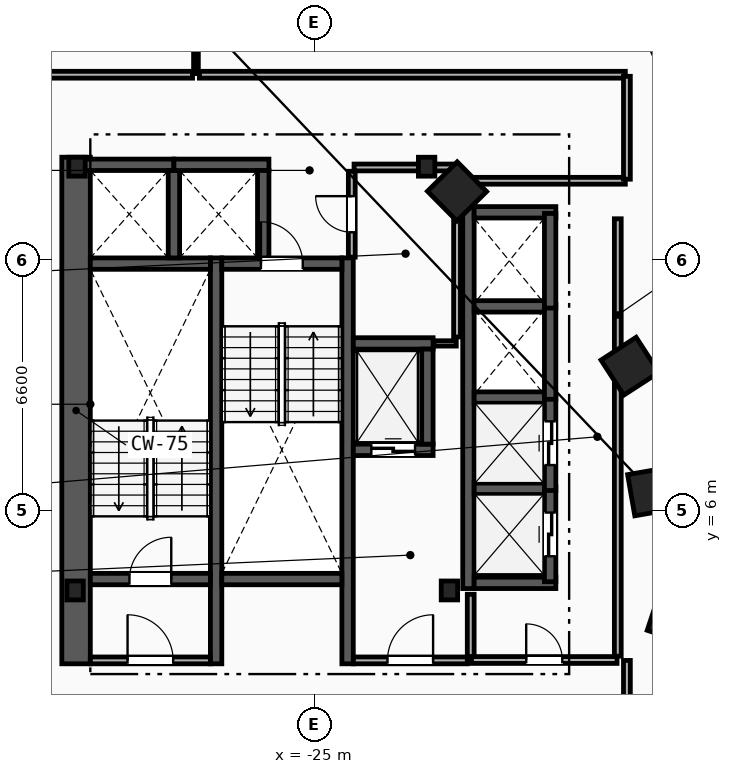
"""IFC4 building model, lengths in metres.
Left out: names, types, materials, properties, quantities, classifications, styles, units other than length and angle.
Written with IfcOpenShell. Run it as: python <this file> out.ifc"""

import sys

from ifc_helpers import new_model, si_unit, direction, frame, frame_2d, origin, origin_2d, place, context, subcontext, project, spatial, rectangle, i_section, extrude, element, fill, save


model = new_model("IFC4")
c1 = context("Model", 3, precision=1e-05, world=origin(), true_north=direction((0.0, 1.0)))
c2 = subcontext(c1, "Body", "Model", "MODEL_VIEW")
j1 = project(units=[si_unit("LENGTHUNIT", "METRE"), si_unit("PLANEANGLEUNIT", "RADIAN")], contexts=[c1])
p1 = place(None, origin())
s1 = spatial("IfcSite", under=j1, at=p1, CompositionType="ELEMENT")
p2 = place(p1, origin())
s2 = spatial("IfcBuilding", under=s1, at=p2, CompositionType="ELEMENT")
p3 = place(p2, frame((0.0, 0.0, 96.2)))
s3 = spatial("IfcBuildingStorey", under=s2, at=p3, CompositionType="ELEMENT", Elevation=96.2)
for number, where, z_axis, x_axis in (
    (1, (-31.3, 3.9, 0.0), (0.0, 0.0, 1.0), (1.0, 0.0, 0.0)),
    (2, (-21.45, 3.9, 0.0), (0.0, 0.0, 1.0), (1.0, 0.0, 0.0)),
    (3, (-22.05, 15.05, 0.0), (0.0, 0.0, 1.0), (1.0, 0.0, 0.0)),
    (4, (-31.25, 15.05, 0.0), (0.0, 0.0, 1.0), (1.0, 0.0, 0.0)),
):
    element("IfcColumn", number, at=place(p3, frame(where, z_axis=z_axis, x_axis=x_axis)), inside=s3, PredefinedType="COLUMN", context=c2, shape_type="SweptSolid", body=[
        extrude(i_section(OverallWidth=0.432, OverallDepth=0.498, WebThickness=0.056, FlangeThickness=0.089, FilletRadius=0.018, at=origin_2d()), origin(), (0.0, 0.0, 1.0), 3.6),
    ])
for number, where, z_axis, x_axis in (
    (5, (-15.55, 3.2, 0.0), (0.0, 0.0, 1.0), (0.315, 0.949, 0.0)),
    (6, (-16.125, 6.5, 0.0), (0.0, 0.0, 1.0), (-0.172, 0.985, 0.0)),
    (7, (-16.7, 9.8, 0.0), (0.0, 0.0, 1.0), (-0.544, 0.839, 0.0)),
    (8, (-21.25, 14.4, 0.0), (0.0, 0.0, 1.0), (-0.703, 0.711, 0.0)),
):
    element("IfcColumn", number, at=place(p3, frame(where, z_axis=z_axis, x_axis=x_axis)), inside=s3, PredefinedType="COLUMN", context=c2, shape_type="SweptSolid", body=[
        extrude(rectangle(XDim=1.1, YDim=1.1, at=origin_2d()), origin(), (0.0, 0.0, 1.0), 3.6),
    ])
p4 = place(p3, frame((-31.275, 1.97, 0.0), z_axis=(0.0, 0.0, 1.0), x_axis=(0.0, 1.0, 0.0)))
e9 = element("IfcWall", 9, at=p4, inside=s3, PredefinedType="SHEAR", context=c2, shape_type="SweptSolid", body=[
    extrude(rectangle(XDim=13.33, YDim=0.75, at=frame_2d((6.665, 0.0))), origin(), (0.0, 0.0, 1.0), 3.3),
])
for number, where, z_axis, x_axis in (
    (10, (-27.59, 1.97, 0.0), (0.0, 0.0, 1.0), (0.0, 1.0, 0.0)),
    (11, (-24.13, 1.97, 0.0), (0.0, 0.0, 1.0), (0.0, 1.0, 0.0)),
):
    element("IfcWall", number, at=place(p3, frame(where, z_axis=z_axis, x_axis=x_axis)), inside=s3, PredefinedType="SHEAR", context=c2, shape_type="SweptSolid", body=[
        extrude(rectangle(XDim=10.68, YDim=0.3, at=frame_2d((5.34, 0.0))), origin(), (0.0, 0.0, 1.0), 3.3),
    ])
p5 = place(p3, frame((-30.9, 4.2, 0.0), z_axis=(0.0, 0.0, 1.0), x_axis=(1.0, 0.0, 0.0)))
e12 = element("IfcWall", 12, at=p5, inside=s3, PredefinedType="SHEAR", context=c2, shape_type="SweptSolid", body=[
    extrude(rectangle(XDim=3.16, YDim=0.3, at=frame_2d((1.58, 0.0))), origin(), (0.0, 0.0, 1.0), 3.3),
])
p6 = place(p5, frame((1.03, 0.0, 0.0)))
e13 = element("IfcOpeningElement", 13, at=p6, cuts=e12, PredefinedType="OPENING", context=c2, shape_type="SweptSolid", body=[
    extrude(rectangle(XDim=1.1, YDim=2.15, at=frame_2d((0.55, 1.075))), frame((0.0, 0.16, 0.0), z_axis=(0.0, -1.0, 0.0), x_axis=(1.0, 0.0, 0.0)), (0.0, 0.0, 1.0), 0.32),
])
p7 = place(p3, frame((-30.9, 12.5, 0.0), z_axis=(0.0, 0.0, 1.0), x_axis=(1.0, 0.0, 0.0)))
e14 = element("IfcWall", 14, at=p7, inside=s3, PredefinedType="SHEAR", context=c2, shape_type="SweptSolid", body=[
    extrude(rectangle(XDim=3.16, YDim=0.3, at=frame_2d((1.58, 0.0))), origin(), (0.0, 0.0, 1.0), 3.3),
])
p8 = place(p3, frame((-27.44, 12.5, 0.0), z_axis=(0.0, 0.0, 1.0), x_axis=(1.0, 0.0, 0.0)))
e15 = element("IfcWall", 15, at=p8, inside=s3, PredefinedType="SHEAR", context=c2, shape_type="SweptSolid", body=[
    extrude(rectangle(XDim=3.16, YDim=0.3, at=frame_2d((1.58, 0.0))), origin(), (0.0, 0.0, 1.0), 3.3),
])
p9 = place(p8, frame((1.03, 0.0, 0.0)))
e16 = element("IfcOpeningElement", 16, at=p9, cuts=e15, PredefinedType="OPENING", context=c2, shape_type="SweptSolid", body=[
    extrude(rectangle(XDim=1.1, YDim=2.15, at=frame_2d((0.55, 1.075))), frame((0.0, 0.16, 0.0), z_axis=(0.0, -1.0, 0.0), x_axis=(1.0, 0.0, 0.0)), (0.0, 0.0, 1.0), 0.32),
])
p10 = place(p3, frame((-27.44, 4.2, 0.0), z_axis=(0.0, 0.0, 1.0), x_axis=(1.0, 0.0, 0.0)))
e17 = element("IfcWall", 17, at=p10, inside=s3, PredefinedType="SHEAR", context=c2, shape_type="SweptSolid", body=[
    extrude(rectangle(XDim=3.16, YDim=0.3, at=frame_2d((1.58, 0.0))), origin(), (0.0, 0.0, 1.0), 3.3),
])
p11 = place(p3, frame((-20.89, 2.15, 0.0), z_axis=(0.0, 0.0, 1.0), x_axis=(0.0, 1.0, 0.0)))
e18 = element("IfcWall", 18, at=p11, inside=s3, PredefinedType="PARTITIONING", context=c2, shape_type="SweptSolid", body=[
    extrude(rectangle(XDim=1.65, YDim=0.18, at=frame_2d((0.825, 0.0))), origin(), (0.0, 0.0, 1.0), 3.3),
])
p12 = place(p3, frame((-23.98, 2.06, 0.0), z_axis=(0.0, 0.0, 1.0), x_axis=(1.0, 0.0, 0.0)))
e19 = element("IfcWall", 19, at=p12, inside=s3, PredefinedType="PARTITIONING", context=c2, shape_type="SweptSolid", body=[
    extrude(rectangle(XDim=3.0, YDim=0.18, at=frame_2d((1.5, 0.0))), origin(), (0.0, 0.0, 1.0), 3.3),
])
p13 = place(p12, frame((0.9, 0.0, 0.0)))
e20 = element("IfcOpeningElement", 20, at=p13, cuts=e19, PredefinedType="OPENING", context=c2, shape_type="SweptSolid", body=[
    extrude(rectangle(XDim=1.2, YDim=2.15, at=frame_2d((0.6, 1.075))), frame((0.0, 0.1, 0.0), z_axis=(0.0, -1.0, 0.0), x_axis=(1.0, 0.0, 0.0)), (0.0, 0.0, 1.0), 0.2),
])
p14 = place(p3, frame((-30.9, 2.06, 0.0), z_axis=(0.0, 0.0, 1.0), x_axis=(1.0, 0.0, 0.0)))
e21 = element("IfcWall", 21, at=p14, inside=s3, PredefinedType="PARTITIONING", context=c2, shape_type="SweptSolid", body=[
    extrude(rectangle(XDim=3.16, YDim=0.18, at=frame_2d((1.58, 0.0))), origin(), (0.0, 0.0, 1.0), 3.3),
])
p15 = place(p14, frame((0.98, 0.0, 0.0)))
e22 = element("IfcOpeningElement", 22, at=p15, cuts=e21, PredefinedType="OPENING", context=c2, shape_type="SweptSolid", body=[
    extrude(rectangle(XDim=1.2, YDim=2.15, at=frame_2d((0.6, 1.075))), frame((0.0, 0.1, 0.0), z_axis=(0.0, -1.0, 0.0), x_axis=(1.0, 0.0, 0.0)), (0.0, 0.0, 1.0), 0.2),
])
p16 = place(p3, frame((-23.98, 7.6, 0.0), z_axis=(0.0, 0.0, 1.0), x_axis=(1.0, 0.0, 0.0)))
e23 = element("IfcWall", 23, at=p16, inside=s3, PredefinedType="SHEAR", context=c2, shape_type="SweptSolid", body=[
    extrude(rectangle(XDim=2.1, YDim=0.3, at=frame_2d((1.05, 0.0))), origin(), (0.0, 0.0, 1.0), 3.3),
])
p17 = place(p16, frame((0.475, 0.0, 0.0)))
e24 = element("IfcOpeningElement", 24, at=p17, cuts=e23, PredefinedType="OPENING", context=c2, shape_type="SweptSolid", body=[
    extrude(rectangle(XDim=1.15, YDim=2.2, at=frame_2d((0.575, 1.1))), frame((0.0, 0.16, 0.0), z_axis=(0.0, -1.0, 0.0), x_axis=(1.0, 0.0, 0.0)), (0.0, 0.0, 1.0), 0.32),
])
p18 = place(p3, frame((-23.98, 10.4, 0.0), z_axis=(0.0, 0.0, 1.0), x_axis=(1.0, 0.0, 0.0)))
e25 = element("IfcWall", 25, at=p18, inside=s3, PredefinedType="SHEAR", context=c2, shape_type="SweptSolid", body=[
    extrude(rectangle(XDim=2.1, YDim=0.3, at=frame_2d((1.05, 0.0))), origin(), (0.0, 0.0, 1.0), 3.3),
])
for number, where, z_axis, x_axis in (
    (26, (-22.03, 7.75, 0.0), (0.0, 0.0, 1.0), (0.0, 1.0, 0.0)),
    (27, (-31.2, 15.1, 0.0), (0.0, 0.0, 1.0), (1.0, 0.0, 0.0)),
):
    element("IfcWall", number, at=place(p3, frame(where, z_axis=z_axis, x_axis=x_axis)), inside=s3, PredefinedType="SHEAR", context=c2, shape_type="SweptSolid", body=[
        extrude(rectangle(XDim=2.5, YDim=0.3, at=frame_2d((1.25, 0.0))), origin(), (0.0, 0.0, 1.0), 3.3),
    ])
p19 = place(p3, frame((-28.7, 12.65, 0.0), z_axis=(0.0, 0.0, 1.0), x_axis=(0.0, 1.0, 0.0)))
e28 = element("IfcWall", 28, at=p19, inside=s3, PredefinedType="SHEAR", context=c2, shape_type="SweptSolid", body=[
    extrude(rectangle(XDim=2.3, YDim=0.3, at=frame_2d((1.15, 0.0))), origin(), (0.0, 0.0, 1.0), 3.3),
])
p20 = place(p3, frame((-28.7, 15.1, 0.0), z_axis=(0.0, 0.0, 1.0), x_axis=(1.0, 0.0, 0.0)))
e29 = element("IfcWall", 29, at=p20, inside=s3, PredefinedType="SHEAR", context=c2, shape_type="SweptSolid", body=[
    extrude(rectangle(XDim=2.5, YDim=0.3, at=frame_2d((1.25, 0.0))), origin(), (0.0, 0.0, 1.0), 3.3),
])
p21 = place(p3, frame((-26.35, 12.65, 0.0), z_axis=(0.0, 0.0, 1.0), x_axis=(0.0, 1.0, 0.0)))
e30 = element("IfcWall", 30, at=p21, inside=s3, PredefinedType="SHEAR", context=c2, shape_type="SweptSolid", body=[
    extrude(rectangle(XDim=2.3, YDim=0.3, at=frame_2d((1.15, 0.0))), origin(), (0.0, 0.0, 1.0), 3.3),
])
p22 = place(p3, frame((-20.95, 3.95, 0.0), z_axis=(0.0, 0.0, 1.0), x_axis=(0.0, 1.0, 0.0)))
e31 = element("IfcWall", 31, at=p22, inside=s3, PredefinedType="SHEAR", context=c2, shape_type="SweptSolid", body=[
    extrude(rectangle(XDim=10.05, YDim=0.3, at=frame_2d((5.025, 0.0))), origin(), (0.0, 0.0, 1.0), 3.3),
])
for number, where, z_axis, x_axis in (
    (32, (-20.8, 4.1, 0.0), (0.0, 0.0, 1.0), (1.0, 0.0, 0.0)),
    (33, (-20.8, 13.85, 0.0), (0.0, 0.0, 1.0), (1.0, 0.0, 0.0)),
):
    element("IfcWall", number, at=place(p3, frame(where, z_axis=z_axis, x_axis=x_axis)), inside=s3, PredefinedType="SHEAR", context=c2, shape_type="SweptSolid", body=[
        extrude(rectangle(XDim=2.15, YDim=0.3, at=frame_2d((1.075, 0.0))), origin(), (0.0, 0.0, 1.0), 3.3),
    ])
for number, where, z_axis, x_axis in (
    (34, (-20.8, 6.575, 0.0), (0.0, 0.0, 1.0), (1.0, 0.0, 0.0)),
    (35, (-20.8, 8.975, 0.0), (0.0, 0.0, 1.0), (1.0, 0.0, 0.0)),
    (36, (-20.8, 11.375, 0.0), (0.0, 0.0, 1.0), (1.0, 0.0, 0.0)),
):
    element("IfcWall", number, at=place(p3, frame(where, z_axis=z_axis, x_axis=x_axis)), inside=s3, PredefinedType="SHEAR", context=c2, shape_type="SweptSolid", body=[
        extrude(rectangle(XDim=1.85, YDim=0.3, at=frame_2d((0.925, 0.0))), origin(), (0.0, 0.0, 1.0), 3.3),
    ])
p23 = place(p3, frame((-18.8, 4.13, 0.0), z_axis=(0.0, 0.0, 1.0), x_axis=(0.0, 1.0, 0.0)))
e37 = element("IfcWall", 37, at=p23, inside=s3, PredefinedType="SHEAR", context=c2, shape_type="SweptSolid", body=[
    extrude(rectangle(XDim=2.49, YDim=0.3, at=frame_2d((1.245, 0.0))), origin(), (0.0, 0.0, 1.0), 3.3),
])
p24 = place(p23, frame((0.67, 0.0, 0.0)))
e38 = element("IfcOpeningElement", 38, at=p24, cuts=e37, PredefinedType="OPENING", context=c2, shape_type="SweptSolid", body=[
    extrude(rectangle(XDim=1.15, YDim=2.2, at=frame_2d((0.575, 1.1))), frame((0.0, 0.16, 0.0), z_axis=(0.0, -1.0, 0.0), x_axis=(1.0, 0.0, 0.0)), (0.0, 0.0, 1.0), 0.32),
])
p25 = place(p3, frame((-18.8, 6.53, 0.0), z_axis=(0.0, 0.0, 1.0), x_axis=(0.0, 1.0, 0.0)))
e39 = element("IfcWall", 39, at=p25, inside=s3, PredefinedType="SHEAR", context=c2, shape_type="SweptSolid", body=[
    extrude(rectangle(XDim=2.49, YDim=0.3, at=frame_2d((1.245, 0.0))), origin(), (0.0, 0.0, 1.0), 3.3),
])
p26 = place(p25, frame((0.67, 0.0, 0.0)))
e40 = element("IfcOpeningElement", 40, at=p26, cuts=e39, PredefinedType="OPENING", context=c2, shape_type="SweptSolid", body=[
    extrude(rectangle(XDim=1.15, YDim=2.2, at=frame_2d((0.575, 1.1))), frame((0.0, 0.16, 0.0), z_axis=(0.0, -1.0, 0.0), x_axis=(1.0, 0.0, 0.0)), (0.0, 0.0, 1.0), 0.32),
])
for number, where, z_axis, x_axis in (
    (41, (-18.8, 8.93, 0.0), (0.0, 0.0, 1.0), (0.0, 1.0, 0.0)),
    (42, (-18.8, 11.33, 0.0), (0.0, 0.0, 1.0), (0.0, 1.0, 0.0)),
):
    element("IfcWall", number, at=place(p3, frame(where, z_axis=z_axis, x_axis=x_axis)), inside=s3, PredefinedType="SHEAR", context=c2, shape_type="SweptSolid", body=[
        extrude(rectangle(XDim=2.49, YDim=0.3, at=frame_2d((1.245, 0.0))), origin(), (0.0, 0.0, 1.0), 3.3),
    ])
p27 = place(p3, frame((-17.02, 2.17, 0.0), z_axis=(0.0, 0.0, 1.0), x_axis=(0.0, 1.0, 0.0)))
e43 = element("IfcWall", 43, at=p27, inside=s3, PredefinedType="PARTITIONING", context=c2, shape_type="SweptSolid", body=[
    extrude(rectangle(XDim=11.51, YDim=0.18, at=frame_2d((5.755, 0.0))), origin(), (0.0, 0.0, 1.0), 3.3),
])
p28 = place(p3, frame((-20.87, 2.07, 0.0), z_axis=(0.0, 0.0, 1.0), x_axis=(1.0, 0.0, 0.0)))
e44 = element("IfcWall", 44, at=p28, inside=s3, PredefinedType="PARTITIONING", context=c2, shape_type="SweptSolid", body=[
    extrude(rectangle(XDim=3.83, YDim=0.18, at=frame_2d((1.915, 0.0))), origin(), (0.0, 0.0, 1.0), 3.3),
])
p29 = place(p28, frame((1.44, 0.0, 0.0)))
e45 = element("IfcOpeningElement", 45, at=p29, cuts=e44, PredefinedType="OPENING", context=c2, shape_type="SweptSolid", body=[
    extrude(rectangle(XDim=0.95, YDim=2.1, at=frame_2d((0.475, 1.05))), frame((0.0, 0.1, 0.0), z_axis=(0.0, -1.0, 0.0), x_axis=(1.0, 0.0, 0.0)), (0.0, 0.0, 1.0), 0.2),
])
p30 = place(p3, frame((-21.86, 10.4, 0.0), z_axis=(0.0, 0.0, 1.0), x_axis=(1.0, 0.0, 0.0)))
e46 = element("IfcWall", 46, at=p30, inside=s3, PredefinedType="PARTITIONING", context=c2, shape_type="SweptSolid", body=[
    extrude(rectangle(XDim=0.59, YDim=0.14, at=frame_2d((0.295, 0.0))), origin(), (0.0, 0.0, 1.0), 3.3),
])
p31 = place(p3, frame((-21.25, 10.57, 0.0), z_axis=(0.0, 0.0, 1.0), x_axis=(0.0, 1.0, 0.0)))
e47 = element("IfcWall", 47, at=p31, inside=s3, PredefinedType="PARTITIONING", context=c2, shape_type="SweptSolid", body=[
    extrude(rectangle(XDim=4.36, YDim=0.18, at=frame_2d((2.18, 0.0))), origin(), (0.0, 0.0, 1.0), 3.3),
])
p32 = place(p3, frame((-23.96, 15.03, 0.0), z_axis=(0.0, 0.0, 1.0), x_axis=(1.0, 0.0, 0.0)))
e48 = element("IfcWall", 48, at=p32, inside=s3, PredefinedType="PARTITIONING", context=c2, shape_type="SweptSolid", body=[
    extrude(rectangle(XDim=2.61, YDim=0.18, at=frame_2d((1.305, 0.0))), origin(), (0.0, 0.0, 1.0), 2.373),
])
p33 = place(p3, frame((-24.02, 12.67, 0.0), z_axis=(0.0, 0.0, 1.0), x_axis=(0.0, 1.0, 0.0)))
e49 = element("IfcWall", 49, at=p33, inside=s3, PredefinedType="PARTITIONING", context=c2, shape_type="SweptSolid", body=[
    extrude(rectangle(XDim=2.26, YDim=0.18, at=frame_2d((1.13, 0.0))), origin(), (0.0, 0.0, 1.0), 3.3),
])
p34 = place(p33, frame((0.655, 0.0, 0.0)))
e50 = element("IfcOpeningElement", 50, at=p34, cuts=e49, PredefinedType="OPENING", context=c2, shape_type="SweptSolid", body=[
    extrude(rectangle(XDim=0.95, YDim=2.1, at=frame_2d((0.475, 1.05))), frame((0.0, 0.1, 0.0), z_axis=(0.0, -1.0, 0.0), x_axis=(1.0, 0.0, 0.0)), (0.0, 0.0, 1.0), 0.2),
])
p35 = place(p3, frame((-28.12, 17.5, 0.0), z_axis=(0.0, 0.0, 1.0), x_axis=(0.0, 1.0, 0.0)))
e51 = element("IfcWall", 51, at=p35, inside=s3, PredefinedType="PARTITIONING", context=c2, shape_type="SweptSolid", body=[
    extrude(rectangle(XDim=8.188, YDim=0.125, at=frame_2d((4.094, 0.0))), origin(), (0.0, 0.0, 1.0), 3.3),
])
p36 = place(p3, frame((-16.822, 17.47, 0.0), z_axis=(0.0, 0.0, 1.0), x_axis=(-1.0, 0.0, 0.0)))
e52 = element("IfcWall", 52, at=p36, inside=s3, PredefinedType="PARTITIONING", context=c2, shape_type="SweptSolid", body=[
    extrude(rectangle(XDim=11.208, YDim=0.18, at=frame_2d((5.604, 0.0))), origin(), (0.0, 0.0, 1.0), 3.3),
])
p37 = place(p3, frame((-21.178, 14.68, 0.0), z_axis=(0.0, 0.0, 1.0), x_axis=(1.0, 0.0, 0.0)))
e53 = element("IfcWall", 53, at=p37, inside=s3, PredefinedType="PARTITIONING", context=c2, shape_type="SweptSolid", body=[
    extrude(rectangle(XDim=4.357, YDim=0.18, at=frame_2d((2.178, 0.0))), origin(), (0.0, 0.0, 1.0), 3.3),
])
p38 = place(p3, frame((-16.78, 14.721, 0.0), z_axis=(0.0, 0.0, 1.0), x_axis=(0.0, 1.0, 0.0)))
e54 = element("IfcWall", 54, at=p38, inside=s3, PredefinedType="PARTITIONING", context=c2, shape_type="SweptSolid", body=[
    extrude(rectangle(XDim=2.707, YDim=0.18, at=frame_2d((1.354, 0.0))), origin(), (0.0, 0.0, 1.0), 3.3),
])
p39 = place(p3, frame((-16.78, -0.329, 0.0), z_axis=(0.0, 0.0, 1.0), x_axis=(0.0, 1.0, 0.0)))
e55 = element("IfcWall", 55, at=p39, inside=s3, PredefinedType="PARTITIONING", context=c2, shape_type="SweptSolid", body=[
    extrude(rectangle(XDim=2.387, YDim=0.18, at=frame_2d((1.194, 0.0))), origin(), (0.0, 0.0, 1.0), 3.3),
])
p40 = place(p3, frame((-28.21, 17.47, 0.0), z_axis=(0.0, 0.0, 1.0), x_axis=(-1.0, 0.0, 0.0)))
e56 = element("IfcWall", 56, at=p40, inside=s3, PredefinedType="PARTITIONING", context=c2, shape_type="SweptSolid", body=[
    extrude(rectangle(XDim=5.418, YDim=0.18, at=frame_2d((2.709, 0.0))), origin(), (0.0, 0.0, 1.0), 3.3),
])
p41 = place(p6, origin())
e57 = element("IfcDoor", 57, at=p41, inside=s3, OperationType="SINGLE_SWING_RIGHT", PredefinedType="DOOR", context=c2, shape_type="SweptSolid", body=[
    extrude(rectangle(XDim=1.1, YDim=2.15, at=frame_2d((0.55, 1.075))), frame((0.0, 0.025, 0.0), z_axis=(0.0, -1.0, 0.0), x_axis=(1.0, 0.0, 0.0)), (0.0, 0.0, 1.0), 0.05),
])
fill(e13, e57)
p42 = place(p9, origin())
e58 = element("IfcDoor", 58, at=p42, inside=s3, OperationType="SINGLE_SWING_LEFT", PredefinedType="DOOR", context=c2, shape_type="SweptSolid", body=[
    extrude(rectangle(XDim=1.1, YDim=2.15, at=frame_2d((0.55, 1.075))), frame((0.0, 0.025, 0.0), z_axis=(0.0, -1.0, 0.0), x_axis=(1.0, 0.0, 0.0)), (0.0, 0.0, 1.0), 0.05),
])
fill(e16, e58)
p43 = place(p13, origin())
e59 = element("IfcDoor", 59, at=p43, inside=s3, OperationType="SINGLE_SWING_RIGHT", PredefinedType="DOOR", context=c2, shape_type="SweptSolid", body=[
    extrude(rectangle(XDim=1.2, YDim=2.15, at=frame_2d((0.6, 1.075))), frame((0.0, 0.025, 0.0), z_axis=(0.0, -1.0, 0.0), x_axis=(1.0, 0.0, 0.0)), (0.0, 0.0, 1.0), 0.05),
])
fill(e20, e59)
p44 = place(p15, origin())
e60 = element("IfcDoor", 60, at=p44, inside=s3, OperationType="SINGLE_SWING_LEFT", PredefinedType="DOOR", context=c2, shape_type="SweptSolid", body=[
    extrude(rectangle(XDim=1.2, YDim=2.15, at=frame_2d((0.6, 1.075))), frame((0.0, 0.025, 0.0), z_axis=(0.0, -1.0, 0.0), x_axis=(1.0, 0.0, 0.0)), (0.0, 0.0, 1.0), 0.05),
])
fill(e22, e60)
p45 = place(p17, origin())
e61 = element("IfcDoor", 61, at=p45, inside=s3, OperationType="SLIDING_TO_LEFT", PredefinedType="TRAPDOOR", context=c2, shape_type="SweptSolid", body=[
    extrude(rectangle(XDim=1.15, YDim=2.2, at=frame_2d((0.575, 1.1))), frame((0.0, 0.025, 0.0), z_axis=(0.0, -1.0, 0.0), x_axis=(1.0, 0.0, 0.0)), (0.0, 0.0, 1.0), 0.05),
])
fill(e24, e61)
p46 = place(p24, origin())
e62 = element("IfcDoor", 62, at=p46, inside=s3, OperationType="SLIDING_TO_LEFT", PredefinedType="TRAPDOOR", context=c2, shape_type="SweptSolid", body=[
    extrude(rectangle(XDim=1.15, YDim=2.2, at=frame_2d((0.575, 1.1))), frame((0.0, 0.025, 0.0), z_axis=(0.0, -1.0, 0.0), x_axis=(1.0, 0.0, 0.0)), (0.0, 0.0, 1.0), 0.05),
])
fill(e38, e62)
p47 = place(p26, origin())
e63 = element("IfcDoor", 63, at=p47, inside=s3, OperationType="SLIDING_TO_LEFT", PredefinedType="TRAPDOOR", context=c2, shape_type="SweptSolid", body=[
    extrude(rectangle(XDim=1.15, YDim=2.2, at=frame_2d((0.575, 1.1))), frame((0.0, 0.025, 0.0), z_axis=(0.0, -1.0, 0.0), x_axis=(1.0, 0.0, 0.0)), (0.0, 0.0, 1.0), 0.05),
])
fill(e40, e63)
p48 = place(p29, origin())
e64 = element("IfcDoor", 64, at=p48, inside=s3, OperationType="SINGLE_SWING_LEFT", PredefinedType="DOOR", context=c2, shape_type="SweptSolid", body=[
    extrude(rectangle(XDim=0.95, YDim=2.1, at=frame_2d((0.475, 1.05))), frame((0.0, 0.025, 0.0), z_axis=(0.0, -1.0, 0.0), x_axis=(1.0, 0.0, 0.0)), (0.0, 0.0, 1.0), 0.05),
])
fill(e45, e64)
p49 = place(p34, origin())
e65 = element("IfcDoor", 65, at=p49, inside=s3, OperationType="SINGLE_SWING_RIGHT", PredefinedType="DOOR", context=c2, shape_type="SweptSolid", body=[
    extrude(rectangle(XDim=0.95, YDim=2.1, at=frame_2d((0.475, 1.05))), frame((0.0, 0.025, 0.0), z_axis=(0.0, -1.0, 0.0), x_axis=(1.0, 0.0, 0.0)), (0.0, 0.0, 1.0), 0.05),
])
fill(e50, e65)
save(model, sys.argv[1])
